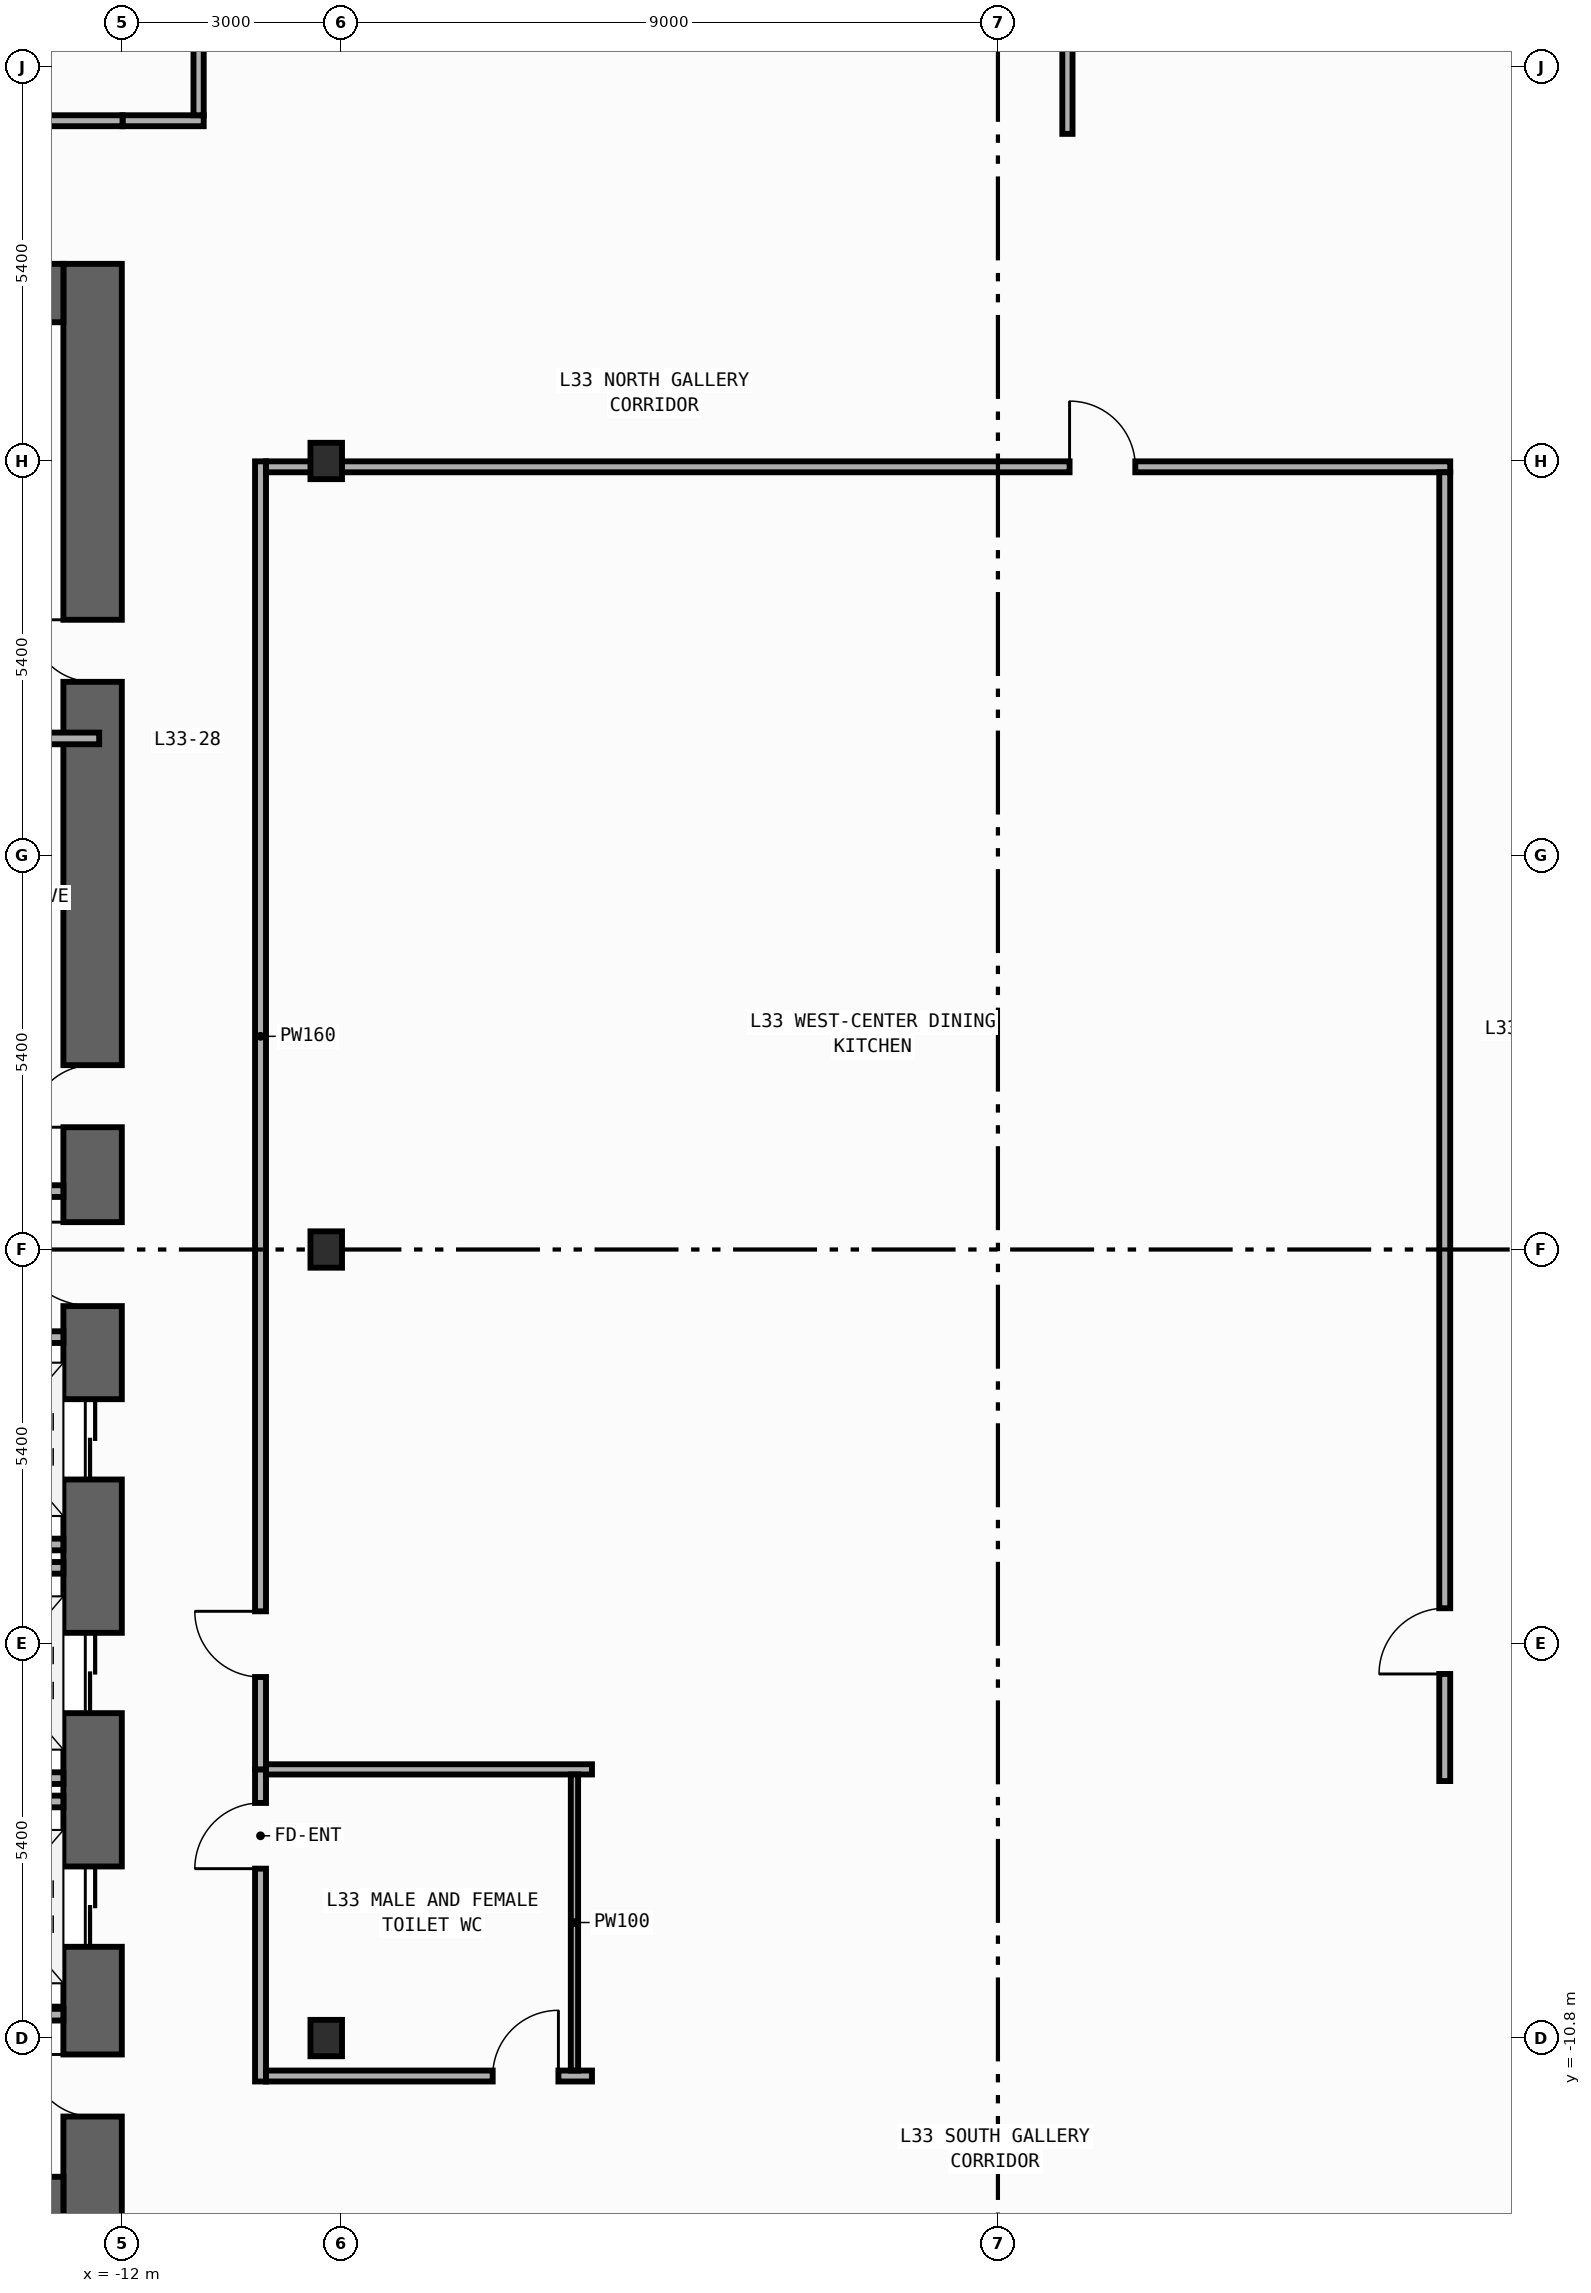
"""IFC4 building model, lengths in metres.
Left out: names, types, materials, properties, quantities, classifications, styles, units other than length and angle.
Written with IfcOpenShell. Run it as: python <this file> out.ifc"""

import sys

from ifc_helpers import new_model, si_unit, direction, frame, frame_2d, origin, origin_2d, place, context, subcontext, project, spatial, rectangle, i_section, extrude, element, fill, save


model = new_model("IFC4")
c1 = context("Model", 3, precision=1e-05, world=origin(), true_north=direction((0.0, 1.0)))
c2 = subcontext(c1, "Body", "Model", "MODEL_VIEW")
j1 = project(units=[si_unit("LENGTHUNIT", "METRE"), si_unit("PLANEANGLEUNIT", "RADIAN")], contexts=[c1])
p1 = place(None, origin())
s1 = spatial("IfcSite", under=j1, at=p1, CompositionType="ELEMENT")
p2 = place(p1, origin())
s2 = spatial("IfcBuilding", under=s1, at=p2, CompositionType="ELEMENT")
p3 = place(p2, frame((0.0, 0.0, 143.6)))
s3 = spatial("IfcBuildingStorey", under=s2, at=p3, CompositionType="ELEMENT", Elevation=143.6)
p4 = place(p3, frame((-12.4, -13.5, 0.0), z_axis=(0.0, 0.0, 1.0), x_axis=(0.0, 1.0, 0.0)))
e1 = element("IfcWall", 1, at=p4, inside=s3, PredefinedType="SHEAR", context=c2, shape_type="SweptSolid", body=[
    extrude(rectangle(XDim=27.0, YDim=0.8, at=frame_2d((13.5, 0.0))), origin(), (0.0, 0.0, 1.0), 3.94),
])
p5 = place(p4, frame((10.35, 0.0, 0.0)))
e2 = element("IfcOpeningElement", 2, at=p5, cuts=e1, PredefinedType="OPENING", context=c2, shape_type="SweptSolid", body=[
    extrude(rectangle(XDim=1.1, YDim=2.2, at=frame_2d((0.55, 1.1))), frame((0.0, 0.41, 0.0), z_axis=(0.0, -1.0, 0.0), x_axis=(1.0, 0.0, 0.0)), (0.0, 0.0, 1.0), 0.82),
])
p6 = place(p4, frame((7.15, 0.0, 0.0)))
e3 = element("IfcOpeningElement", 3, at=p6, cuts=e1, PredefinedType="OPENING", context=c2, shape_type="SweptSolid", body=[
    extrude(rectangle(XDim=1.1, YDim=2.2, at=frame_2d((0.55, 1.1))), frame((0.0, 0.41, 0.0), z_axis=(0.0, -1.0, 0.0), x_axis=(1.0, 0.0, 0.0)), (0.0, 0.0, 1.0), 0.82),
])
p7 = place(p4, frame((3.95, 0.0, 0.0)))
e4 = element("IfcOpeningElement", 4, at=p7, cuts=e1, PredefinedType="OPENING", context=c2, shape_type="SweptSolid", body=[
    extrude(rectangle(XDim=1.1, YDim=2.2, at=frame_2d((0.55, 1.1))), frame((0.0, 0.41, 0.0), z_axis=(0.0, -1.0, 0.0), x_axis=(1.0, 0.0, 0.0)), (0.0, 0.0, 1.0), 0.82),
])
p8 = place(p4, frame((15.175, 0.0, 0.0)))
e5 = element("IfcOpeningElement", 5, at=p8, cuts=e1, PredefinedType="OPENING", context=c2, shape_type="SweptSolid", body=[
    extrude(rectangle(XDim=0.85, YDim=2.1, at=frame_2d((0.425, 1.05))), frame((0.0, 0.41, 0.0), z_axis=(0.0, -1.0, 0.0), x_axis=(1.0, 0.0, 0.0)), (0.0, 0.0, 1.0), 0.82),
])
p9 = place(p4, frame((21.275, 0.0, 0.0)))
e6 = element("IfcOpeningElement", 6, at=p9, cuts=e1, PredefinedType="OPENING", context=c2, shape_type="SweptSolid", body=[
    extrude(rectangle(XDim=0.85, YDim=2.1, at=frame_2d((0.425, 1.05))), frame((0.0, 0.41, 0.0), z_axis=(0.0, -1.0, 0.0), x_axis=(1.0, 0.0, 0.0)), (0.0, 0.0, 1.0), 0.82),
])
p10 = place(p4, frame((12.725, 0.0, 0.0)))
e7 = element("IfcOpeningElement", 7, at=p10, cuts=e1, PredefinedType="OPENING", context=c2, shape_type="SweptSolid", body=[
    extrude(rectangle(XDim=1.15, YDim=2.2, at=frame_2d((0.575, 1.1))), frame((0.0, 0.41, 0.0), z_axis=(0.0, -1.0, 0.0), x_axis=(1.0, 0.0, 0.0)), (0.0, 0.0, 1.0), 0.82),
])
p11 = place(p4, frame((1.625, 0.0, 0.0)))
e8 = element("IfcOpeningElement", 8, at=p11, cuts=e1, PredefinedType="OPENING", context=c2, shape_type="SweptSolid", body=[
    extrude(rectangle(XDim=0.85, YDim=2.1, at=frame_2d((0.425, 1.05))), frame((0.0, 0.41, 0.0), z_axis=(0.0, -1.0, 0.0), x_axis=(1.0, 0.0, 0.0)), (0.0, 0.0, 1.0), 0.82),
])
for number, where, z_axis, x_axis in (
    (9, (-19.6, -13.1, 0.0), (0.0, 0.0, 1.0), (1.0, 0.0, 0.0)),
    (10, (-19.6, 13.1, 0.0), (0.0, 0.0, 1.0), (1.0, 0.0, 0.0)),
):
    element("IfcWall", number, at=place(p3, frame(where, z_axis=z_axis, x_axis=x_axis)), inside=s3, PredefinedType="SHEAR", context=c2, shape_type="SweptSolid", body=[
        extrude(rectangle(XDim=6.8, YDim=0.8, at=frame_2d((3.4, 0.0))), origin(), (0.0, 0.0, 1.0), 3.94),
    ])
for number, where, z_axis, x_axis in (
    (11, (-9.2, -10.8, 0.0), (0.0, 0.0, 1.0), (1.0, 0.0, 0.0)),
    (12, (-9.2, 0.0, 0.0), (0.0, 0.0, 1.0), (1.0, 0.0, 0.0)),
    (13, (-9.2, 10.8, 0.0), (0.0, 0.0, 1.0), (1.0, 0.0, 0.0)),
):
    element("IfcColumn", number, at=place(p3, frame(where, z_axis=z_axis, x_axis=x_axis)), inside=s3, PredefinedType="COLUMN", context=c2, shape_type="SweptSolid", body=[
        extrude(i_section(OverallWidth=0.432, OverallDepth=0.498, WebThickness=0.045, FlangeThickness=0.07, FilletRadius=0.022, at=origin_2d()), origin(), (0.0, 0.0, 1.0), 4.2),
    ])
for number, where, z_axis, x_axis in (
    (14, (-14.99, -4.04, 0.0), (0.0, 0.0, 1.0), (1.0, 0.0, 0.0)),
    (15, (-14.99, -7.24, 0.0), (0.0, 0.0, 1.0), (1.0, 0.0, 0.0)),
    (16, (-14.99, -4.36, 0.0), (0.0, 0.0, 1.0), (1.0, 0.0, 0.0)),
    (17, (-14.99, -7.56, 0.0), (0.0, 0.0, 1.0), (1.0, 0.0, 0.0)),
):
    element("IfcWall", number, at=place(p3, frame(where, z_axis=z_axis, x_axis=x_axis)), inside=s3, PredefinedType="STANDARD", context=c2, shape_type="SweptSolid", body=[
        extrude(rectangle(XDim=2.19, YDim=0.16, at=frame_2d((1.095, 0.0))), origin(), (0.0, 0.0, 1.0), 3.94),
    ])
for number, where, z_axis, x_axis in (
    (18, (-15.4, 0.8, 0.0), (0.0, 0.0, 1.0), (1.0, 0.0, 0.0)),
    (19, (-15.4, -1.2, 0.0), (0.0, 0.0, 1.0), (1.0, 0.0, 0.0)),
    (20, (-15.4, -10.48, 0.0), (0.0, 0.0, 1.0), (1.0, 0.0, 0.0)),
):
    element("IfcWall", number, at=place(p3, frame(where, z_axis=z_axis, x_axis=x_axis)), inside=s3, PredefinedType="STANDARD", context=c2, shape_type="SweptSolid", body=[
        extrude(rectangle(XDim=2.6, YDim=0.16, at=frame_2d((1.3, 0.0))), origin(), (0.0, 0.0, 1.0), 3.94),
    ])
p12 = place(p3, frame((-15.375, 7.0, 0.0), z_axis=(0.0, 0.0, 1.0), x_axis=(1.0, 0.0, 0.0)))
e21 = element("IfcWall", 21, at=p12, inside=s3, PredefinedType="PARTITIONING", context=c2, shape_type="SweptSolid", body=[
    extrude(rectangle(XDim=3.065, YDim=0.16, at=frame_2d((1.532, 0.0))), origin(), (0.0, 0.0, 1.0), 3.94),
])
p13 = place(p3, frame((-11.99, 15.46, 0.0), z_axis=(0.0, 0.0, 1.0), x_axis=(1.0, 0.0, 0.0)))
e22 = element("IfcWall", 22, at=p13, inside=s3, PredefinedType="PARTITIONING", context=c2, shape_type="SweptSolid", body=[
    extrude(rectangle(XDim=1.112, YDim=0.15, at=frame_2d((0.556, 0.0))), origin(), (0.0, 0.0, 1.0), 3.94),
])
p14 = place(p3, frame((-10.1, -11.395, 0.0), z_axis=(0.0, 0.0, 1.0), x_axis=(0.0, 1.0, 0.0)))
e23 = element("IfcWall", 23, at=p14, inside=s3, PredefinedType="PARTITIONING", context=c2, shape_type="SweptSolid", body=[
    extrude(rectangle(XDim=4.275, YDim=0.15, at=frame_2d((2.137, 0.0))), origin(), (0.0, 0.0, 1.0), 3.94),
])
p15 = place(p14, frame((2.915, 0.0, 0.0)))
e24 = element("IfcOpeningElement", 24, at=p15, cuts=e23, PredefinedType="OPENING", context=c2, shape_type="SweptSolid", body=[
    extrude(rectangle(XDim=0.9, YDim=2.15, at=frame_2d((0.45, 1.075))), frame((0.0, 0.085, 0.0), z_axis=(0.0, -1.0, 0.0), x_axis=(1.0, 0.0, 0.0)), (0.0, 0.0, 1.0), 0.17),
])
p16 = place(p3, frame((-10.1, -7.12, 0.0), z_axis=(0.0, 0.0, 1.0), x_axis=(0.0, 1.0, 0.0)))
e25 = element("IfcWall", 25, at=p16, inside=s3, PredefinedType="PARTITIONING", context=c2, shape_type="SweptSolid", body=[
    extrude(rectangle(XDim=17.915, YDim=0.15, at=frame_2d((8.958, 0.0))), origin(), (0.0, 0.0, 1.0), 3.94),
])
p17 = place(p16, frame((1.265, 0.0, 0.0)))
e26 = element("IfcOpeningElement", 26, at=p17, cuts=e25, PredefinedType="OPENING", context=c2, shape_type="SweptSolid", body=[
    extrude(rectangle(XDim=0.9, YDim=2.15, at=frame_2d((0.45, 1.075))), frame((0.0, 0.085, 0.0), z_axis=(0.0, -1.0, 0.0), x_axis=(1.0, 0.0, 0.0)), (0.0, 0.0, 1.0), 0.17),
])
p18 = place(p3, frame((-10.025, 10.72, 0.0), z_axis=(0.0, 0.0, 1.0), x_axis=(1.0, 0.0, 0.0)))
e27 = element("IfcWall", 27, at=p18, inside=s3, PredefinedType="PARTITIONING", context=c2, shape_type="SweptSolid", body=[
    extrude(rectangle(XDim=16.22, YDim=0.15, at=frame_2d((8.11, 0.0))), origin(), (0.0, 0.0, 1.0), 3.24),
])
p19 = place(p18, frame((11.007, 0.0, 0.0)))
e28 = element("IfcOpeningElement", 28, at=p19, cuts=e27, PredefinedType="OPENING", context=c2, shape_type="SweptSolid", body=[
    extrude(rectangle(XDim=0.9, YDim=2.15, at=frame_2d((0.45, 1.075))), frame((0.0, 0.085, 0.0), z_axis=(0.0, -1.0, 0.0), x_axis=(1.0, 0.0, 0.0)), (0.0, 0.0, 1.0), 0.17),
])
p20 = place(p3, frame((-10.025, -11.32, 0.0), z_axis=(0.0, 0.0, 1.0), x_axis=(1.0, 0.0, 0.0)))
e29 = element("IfcWall", 29, at=p20, inside=s3, PredefinedType="PARTITIONING", context=c2, shape_type="SweptSolid", body=[
    extrude(rectangle(XDim=4.465, YDim=0.15, at=frame_2d((2.232, 0.0))), origin(), (0.0, 0.0, 1.0), 3.94),
])
p21 = place(p20, frame((3.105, 0.0, 0.0)))
e30 = element("IfcOpeningElement", 30, at=p21, cuts=e29, PredefinedType="OPENING", context=c2, shape_type="SweptSolid", body=[
    extrude(rectangle(XDim=0.9, YDim=2.15, at=frame_2d((0.45, 1.075))), frame((0.0, 0.085, 0.0), z_axis=(0.0, -1.0, 0.0), x_axis=(1.0, 0.0, 0.0)), (0.0, 0.0, 1.0), 0.17),
])
p22 = place(p3, frame((6.12, -7.28, 0.0), z_axis=(0.0, 0.0, 1.0), x_axis=(0.0, 1.0, 0.0)))
e31 = element("IfcWall", 31, at=p22, inside=s3, PredefinedType="PARTITIONING", context=c2, shape_type="SweptSolid", body=[
    extrude(rectangle(XDim=17.925, YDim=0.15, at=frame_2d((8.962, 0.0))), origin(), (0.0, 0.0, 1.0), 3.94),
])
p23 = place(p22, frame((1.467, 0.0, 0.0)))
e32 = element("IfcOpeningElement", 32, at=p23, cuts=e31, PredefinedType="OPENING", context=c2, shape_type="SweptSolid", body=[
    extrude(rectangle(XDim=0.9, YDim=2.15, at=frame_2d((0.45, 1.075))), frame((0.0, 0.085, 0.0), z_axis=(0.0, -1.0, 0.0), x_axis=(1.0, 0.0, 0.0)), (0.0, 0.0, 1.0), 0.17),
])
p24 = place(p3, frame((-20.64, 15.46, 0.0), z_axis=(0.0, 0.0, 1.0), x_axis=(1.0, 0.0, 0.0)))
e33 = element("IfcWall", 33, at=p24, inside=s3, PredefinedType="PARTITIONING", context=c2, shape_type="SweptSolid", body=[
    extrude(rectangle(XDim=8.65, YDim=0.15, at=frame_2d((4.325, 0.0))), origin(), (0.0, 0.0, 1.0), 3.94),
])
p25 = place(p24, frame((2.871, 0.0, 0.0)))
e34 = element("IfcOpeningElement", 34, at=p25, cuts=e33, PredefinedType="OPENING", context=c2, shape_type="SweptSolid", body=[
    extrude(rectangle(XDim=0.9, YDim=2.15, at=frame_2d((0.45, 1.075))), frame((0.0, 0.085, 0.0), z_axis=(0.0, -1.0, 0.0), x_axis=(1.0, 0.0, 0.0)), (0.0, 0.0, 1.0), 0.17),
])
p26 = place(p3, frame((-10.948, 15.535, 0.0), z_axis=(0.0, 0.0, 1.0), x_axis=(0.0, 1.0, 0.0)))
e35 = element("IfcWall", 35, at=p26, inside=s3, PredefinedType="PARTITIONING", context=c2, shape_type="SweptSolid", body=[
    extrude(rectangle(XDim=10.62, YDim=0.14, at=frame_2d((5.31, 0.0))), origin(), (0.0, 0.0, 1.0), 3.94),
])
p27 = place(p26, frame((6.293, 0.0, 0.0)))
e36 = element("IfcOpeningElement", 36, at=p27, cuts=e35, PredefinedType="OPENING", context=c2, shape_type="SweptSolid", body=[
    extrude(rectangle(XDim=0.85, YDim=2.1, at=frame_2d((0.425, 1.05))), frame((0.0, 0.08, 0.0), z_axis=(0.0, -1.0, 0.0), x_axis=(1.0, 0.0, 0.0)), (0.0, 0.0, 1.0), 0.16),
])
p28 = place(p3, frame((0.952, 15.28, 0.0), z_axis=(0.0, 0.0, 1.0), x_axis=(0.0, 1.0, 0.0)))
e37 = element("IfcWall", 37, at=p28, inside=s3, PredefinedType="PARTITIONING", context=c2, shape_type="SweptSolid", body=[
    extrude(rectangle(XDim=10.875, YDim=0.14, at=frame_2d((5.438, 0.0))), origin(), (0.0, 0.0, 1.0), 3.94),
])
p29 = place(p3, frame((-10.025, -7.12, 0.0), z_axis=(0.0, 0.0, 1.0), x_axis=(1.0, 0.0, 0.0)))
e38 = element("IfcWall", 38, at=p29, inside=s3, PredefinedType="PARTITIONING", context=c2, shape_type="SweptSolid", body=[
    extrude(rectangle(XDim=4.465, YDim=0.14, at=frame_2d((2.232, 0.0))), origin(), (0.0, 0.0, 1.0), 3.94),
])
p30 = place(p3, frame((-5.8, -7.19, 0.0), z_axis=(0.0, 0.0, 1.0), x_axis=(0.0, -1.0, 0.0)))
e39 = element("IfcWall", 39, at=p30, inside=s3, PredefinedType="PARTITIONING", context=c2, shape_type="SweptSolid", body=[
    extrude(rectangle(XDim=4.055, YDim=0.1, at=frame_2d((2.028, 0.0))), origin(), (0.0, 0.0, 1.0), 3.94),
])
p31 = place(p5, origin())
e40 = element("IfcDoor", 40, at=p31, inside=s3, OperationType="DOUBLE_DOOR_SLIDING", PredefinedType="DOOR", context=c2, shape_type="SweptSolid", body=[
    extrude(rectangle(XDim=1.1, YDim=2.2, at=frame_2d((0.55, 1.1))), frame((0.0, 0.025, 0.0), z_axis=(0.0, -1.0, 0.0), x_axis=(1.0, 0.0, 0.0)), (0.0, 0.0, 1.0), 0.05),
])
fill(e2, e40)
p32 = place(p6, origin())
e41 = element("IfcDoor", 41, at=p32, inside=s3, OperationType="DOUBLE_DOOR_SLIDING", PredefinedType="DOOR", context=c2, shape_type="SweptSolid", body=[
    extrude(rectangle(XDim=1.1, YDim=2.2, at=frame_2d((0.55, 1.1))), frame((0.0, 0.025, 0.0), z_axis=(0.0, -1.0, 0.0), x_axis=(1.0, 0.0, 0.0)), (0.0, 0.0, 1.0), 0.05),
])
fill(e3, e41)
p33 = place(p7, origin())
e42 = element("IfcDoor", 42, at=p33, inside=s3, OperationType="DOUBLE_DOOR_SLIDING", PredefinedType="DOOR", context=c2, shape_type="SweptSolid", body=[
    extrude(rectangle(XDim=1.1, YDim=2.2, at=frame_2d((0.55, 1.1))), frame((0.0, 0.025, 0.0), z_axis=(0.0, -1.0, 0.0), x_axis=(1.0, 0.0, 0.0)), (0.0, 0.0, 1.0), 0.05),
])
fill(e4, e42)
p34 = place(p8, origin())
e43 = element("IfcDoor", 43, at=p34, inside=s3, OperationType="SINGLE_SWING_LEFT", PredefinedType="DOOR", context=c2, shape_type="SweptSolid", body=[
    extrude(rectangle(XDim=0.85, YDim=2.1, at=frame_2d((0.425, 1.05))), frame((0.0, 0.025, 0.0), z_axis=(0.0, -1.0, 0.0), x_axis=(1.0, 0.0, 0.0)), (0.0, 0.0, 1.0), 0.05),
])
fill(e5, e43)
p35 = place(p9, origin())
e44 = element("IfcDoor", 44, at=p35, inside=s3, OperationType="SINGLE_SWING_RIGHT", PredefinedType="DOOR", context=c2, shape_type="SweptSolid", body=[
    extrude(rectangle(XDim=0.85, YDim=2.1, at=frame_2d((0.425, 1.05))), frame((0.0, 0.025, 0.0), z_axis=(0.0, -1.0, 0.0), x_axis=(1.0, 0.0, 0.0)), (0.0, 0.0, 1.0), 0.05),
])
fill(e6, e44)
p36 = place(p10, origin())
e45 = element("IfcDoor", 45, at=p36, inside=s3, OperationType="SINGLE_SWING_RIGHT", PredefinedType="DOOR", context=c2, shape_type="SweptSolid", body=[
    extrude(rectangle(XDim=1.15, YDim=2.2, at=frame_2d((0.575, 1.1))), frame((0.0, 0.025, 0.0), z_axis=(0.0, -1.0, 0.0), x_axis=(1.0, 0.0, 0.0)), (0.0, 0.0, 1.0), 0.05),
])
fill(e7, e45)
p37 = place(p11, origin())
e46 = element("IfcDoor", 46, at=p37, inside=s3, OperationType="SINGLE_SWING_RIGHT", PredefinedType="DOOR", context=c2, shape_type="SweptSolid", body=[
    extrude(rectangle(XDim=0.85, YDim=2.1, at=frame_2d((0.425, 1.05))), frame((0.0, 0.025, 0.0), z_axis=(0.0, -1.0, 0.0), x_axis=(1.0, 0.0, 0.0)), (0.0, 0.0, 1.0), 0.05),
])
fill(e8, e46)
p38 = place(p15, origin())
e47 = element("IfcDoor", 47, at=p38, inside=s3, OperationType="SINGLE_SWING_LEFT", PredefinedType="DOOR", context=c2, shape_type="SweptSolid", body=[
    extrude(rectangle(XDim=0.9, YDim=2.15, at=frame_2d((0.45, 1.075))), frame((0.0, 0.025, 0.0), z_axis=(0.0, -1.0, 0.0), x_axis=(1.0, 0.0, 0.0)), (0.0, 0.0, 1.0), 0.05),
])
fill(e24, e47)
p39 = place(p17, origin())
e48 = element("IfcDoor", 48, at=p39, inside=s3, OperationType="SINGLE_SWING_RIGHT", PredefinedType="DOOR", context=c2, shape_type="SweptSolid", body=[
    extrude(rectangle(XDim=0.9, YDim=2.15, at=frame_2d((0.45, 1.075))), frame((0.0, 0.025, 0.0), z_axis=(0.0, -1.0, 0.0), x_axis=(1.0, 0.0, 0.0)), (0.0, 0.0, 1.0), 0.05),
])
fill(e26, e48)
p40 = place(p19, origin())
e49 = element("IfcDoor", 49, at=p40, inside=s3, OperationType="SINGLE_SWING_LEFT", PredefinedType="DOOR", context=c2, shape_type="SweptSolid", body=[
    extrude(rectangle(XDim=0.9, YDim=2.15, at=frame_2d((0.45, 1.075))), frame((0.0, 0.025, 0.0), z_axis=(0.0, -1.0, 0.0), x_axis=(1.0, 0.0, 0.0)), (0.0, 0.0, 1.0), 0.05),
])
fill(e28, e49)
p41 = place(p21, origin())
e50 = element("IfcDoor", 50, at=p41, inside=s3, OperationType="SINGLE_SWING_RIGHT", PredefinedType="DOOR", context=c2, shape_type="SweptSolid", body=[
    extrude(rectangle(XDim=0.9, YDim=2.15, at=frame_2d((0.45, 1.075))), frame((0.0, 0.025, 0.0), z_axis=(0.0, -1.0, 0.0), x_axis=(1.0, 0.0, 0.0)), (0.0, 0.0, 1.0), 0.05),
])
fill(e30, e50)
p42 = place(p23, origin())
e51 = element("IfcDoor", 51, at=p42, inside=s3, OperationType="SINGLE_SWING_LEFT", PredefinedType="DOOR", context=c2, shape_type="SweptSolid", body=[
    extrude(rectangle(XDim=0.9, YDim=2.15, at=frame_2d((0.45, 1.075))), frame((0.0, 0.025, 0.0), z_axis=(0.0, -1.0, 0.0), x_axis=(1.0, 0.0, 0.0)), (0.0, 0.0, 1.0), 0.05),
])
fill(e32, e51)
save(model, sys.argv[1])
